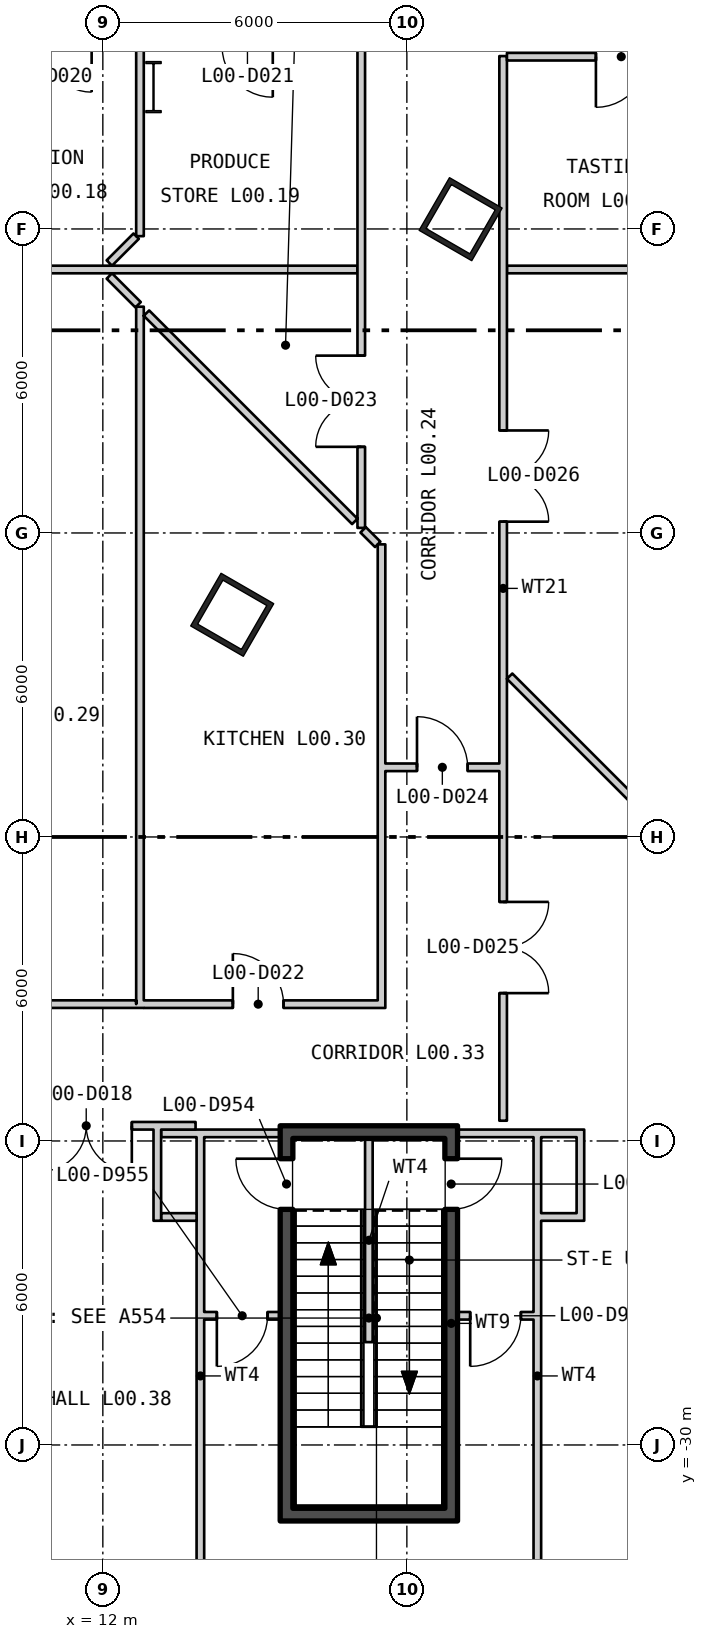
"""IFC4 building model, lengths in metres.
Left out: names, types, materials, properties, quantities, classifications, styles, units other than length and angle.
Written with IfcOpenShell. Run it as: python <this file> out.ifc"""

import sys

from ifc_helpers import new_model, si_unit, direction, frame, frame_2d, origin, origin_2d, place, context, subcontext, project, spatial, rectangle, hollow_rectangle, i_section, extrude, element, fill, save


model = new_model("IFC4")
c1 = context("Model", 3, precision=1e-05, world=origin(), true_north=direction((0.0, 1.0)))
c2 = subcontext(c1, "Body", "Model", "MODEL_VIEW")
j1 = project(units=[si_unit("LENGTHUNIT", "METRE"), si_unit("PLANEANGLEUNIT", "RADIAN")], contexts=[c1])
p1 = place(None, origin())
s1 = spatial("IfcSite", under=j1, at=p1, CompositionType="ELEMENT")
p2 = place(p1, origin())
s2 = spatial("IfcBuilding", under=s1, at=p2, CompositionType="ELEMENT")
p3 = place(p2, origin())
s3 = spatial("IfcBuildingStorey", under=s2, at=p3, CompositionType="ELEMENT", Elevation=0.0)
for number, where, z_axis, x_axis in (
    (1, (14.553, -13.615, 0.0), (0.0, 0.0, 1.0), (0.5, 0.866, 0.0)),
    (2, (19.061, -5.807, 0.0), (0.0, 0.0, 1.0), (0.5, 0.866, 0.0)),
):
    element("IfcColumn", number, at=place(p3, frame(where, z_axis=z_axis, x_axis=x_axis)), inside=s3, PredefinedType="COLUMN", context=c2, shape_type="SweptSolid", body=[
        extrude(hollow_rectangle(XDim=1.2, YDim=1.2, WallThickness=0.1, at=origin_2d()), origin(), (0.0, 0.0, 1.0), 8.4),
    ])
p4 = place(p3, frame((13.0, -3.2, 0.0), z_axis=(0.0, 0.0, 1.0), x_axis=(1.0, 0.0, 0.0)))
e3 = element("IfcColumn", 3, at=p4, inside=s3, PredefinedType="COLUMN", context=c2, shape_type="SweptSolid", body=[
    extrude(i_section(OverallWidth=0.302, OverallDepth=1.008, WebThickness=0.021, FlangeThickness=0.04, at=origin_2d()), origin(), (0.0, 0.0, 1.0), 8.4),
])
p5 = place(p3, frame((15.625, -31.25, 0.0), z_axis=(0.0, 0.0, 1.0), x_axis=(0.0, 1.0, 0.0)))
e4 = element("IfcWall", 4, at=p5, inside=s3, PredefinedType="SHEAR", context=c2, shape_type="SweptSolid", body=[
    extrude(rectangle(XDim=7.3, YDim=0.25, at=frame_2d((3.65, 0.0))), origin(), (0.0, 0.0, 1.0), 8.18),
])
p6 = place(p5, frame((5.9, 0.0, 0.0)))
e5 = element("IfcOpeningElement", 5, at=p6, cuts=e4, PredefinedType="OPENING", context=c2, shape_type="SweptSolid", body=[
    extrude(rectangle(XDim=1.0, YDim=2.1, at=frame_2d((0.5, 1.05))), frame((0.0, 0.135, 0.0), z_axis=(0.0, -1.0, 0.0), x_axis=(1.0, 0.0, 0.0)), (0.0, 0.0, 1.0), 0.27),
])
p7 = place(p3, frame((18.875, -31.25, 0.0), z_axis=(0.0, 0.0, 1.0), x_axis=(0.0, 1.0, 0.0)))
e6 = element("IfcWall", 6, at=p7, inside=s3, PredefinedType="SHEAR", context=c2, shape_type="SweptSolid", body=[
    extrude(rectangle(XDim=7.3, YDim=0.25, at=frame_2d((3.65, 0.0))), origin(), (0.0, 0.0, 1.0), 8.18),
])
p8 = place(p7, frame((5.9, 0.0, 0.0)))
e7 = element("IfcOpeningElement", 7, at=p8, cuts=e6, PredefinedType="OPENING", context=c2, shape_type="SweptSolid", body=[
    extrude(rectangle(XDim=1.0, YDim=2.1, at=frame_2d((0.5, 1.05))), frame((0.0, 0.135, 0.0), z_axis=(0.0, -1.0, 0.0), x_axis=(1.0, 0.0, 0.0)), (0.0, 0.0, 1.0), 0.27),
])
for number, where, z_axis, x_axis in (
    (8, (15.5, -31.375, 0.0), (0.0, 0.0, 1.0), (1.0, 0.0, 0.0)),
    (9, (15.5, -23.825, 0.0), (0.0, 0.0, 1.0), (1.0, 0.0, 0.0)),
):
    element("IfcWall", number, at=place(p3, frame(where, z_axis=z_axis, x_axis=x_axis)), inside=s3, PredefinedType="SHEAR", context=c2, shape_type="SweptSolid", body=[
        extrude(rectangle(XDim=3.5, YDim=0.25, at=frame_2d((1.75, 0.0))), origin(), (0.0, 0.0, 1.0), 8.18),
    ])
p9 = place(p3, frame((17.25, -27.97, 0.0), z_axis=(0.0, 0.0, 1.0), x_axis=(0.0, 1.0, 0.0)))
e10 = element("IfcWall", 10, at=p9, inside=s3, PredefinedType="PARTITIONING", context=c2, shape_type="SweptSolid", body=[
    extrude(rectangle(XDim=4.02, YDim=0.15, at=frame_2d((2.01, 0.0))), origin(), (0.0, 0.0, 1.0), 4.0),
])
p10 = place(p3, frame((20.575, -33.35, 0.0), z_axis=(0.0, 0.0, 1.0), x_axis=(0.0, 1.0, 0.0)))
e11 = element("IfcWall", 11, at=p10, inside=s3, PredefinedType="PARTITIONING", context=c2, shape_type="SweptSolid", body=[
    extrude(rectangle(XDim=9.425, YDim=0.15, at=frame_2d((4.713, 0.0))), origin(), (0.0, 0.0, 1.0), 8.18),
])
p11 = place(p3, frame((19.0, -23.85, 0.0), z_axis=(0.0, 0.0, 1.0), x_axis=(1.0, 0.0, 0.0)))
e12 = element("IfcWall", 12, at=p11, inside=s3, PredefinedType="PARTITIONING", context=c2, shape_type="SweptSolid", body=[
    extrude(rectangle(XDim=2.35, YDim=0.15, at=frame_2d((1.175, 0.0))), origin(), (0.0, 0.0, 1.0), 8.18),
])
p12 = place(p3, frame((19.0, -27.45, 0.0), z_axis=(0.0, 0.0, 1.0), x_axis=(1.0, 0.0, 0.0)))
e13 = element("IfcWall", 13, at=p12, inside=s3, PredefinedType="PARTITIONING", context=c2, shape_type="SweptSolid", body=[
    extrude(rectangle(XDim=1.5, YDim=0.15, at=frame_2d((0.75, 0.0))), origin(), (0.0, 0.0, 1.0), 8.18),
])
p13 = place(p12, frame((0.25, 0.0, 0.0)))
e14 = element("IfcOpeningElement", 14, at=p13, cuts=e13, PredefinedType="OPENING", context=c2, shape_type="SweptSolid", body=[
    extrude(rectangle(XDim=1.0, YDim=2.1, at=frame_2d((0.5, 1.05))), frame((0.0, 0.085, 0.0), z_axis=(0.0, -1.0, 0.0), x_axis=(1.0, 0.0, 0.0)), (0.0, 0.0, 1.0), 0.17),
])
p14 = place(p3, frame((21.425, -25.575, 0.0), z_axis=(0.0, 0.0, 1.0), x_axis=(0.0, 1.0, 0.0)))
e15 = element("IfcWall", 15, at=p14, inside=s3, PredefinedType="PARTITIONING", context=c2, shape_type="SweptSolid", body=[
    extrude(rectangle(XDim=1.8, YDim=0.15, at=frame_2d((0.9, 0.0))), origin(), (0.0, 0.0, 1.0), 8.18),
])
p15 = place(p3, frame((20.65, -25.5, 0.0), z_axis=(0.0, 0.0, 1.0), x_axis=(1.0, 0.0, 0.0)))
e16 = element("IfcWall", 16, at=p15, inside=s3, PredefinedType="PARTITIONING", context=c2, shape_type="SweptSolid", body=[
    extrude(rectangle(XDim=0.7, YDim=0.15, at=frame_2d((0.35, 0.0))), origin(), (0.0, 0.0, 1.0), 8.18),
])
p16 = place(p3, frame((13.925, -33.35, 0.0), z_axis=(0.0, 0.0, 1.0), x_axis=(0.0, 1.0, 0.0)))
e17 = element("IfcWall", 17, at=p16, inside=s3, PredefinedType="PARTITIONING", context=c2, shape_type="SweptSolid", body=[
    extrude(rectangle(XDim=9.425, YDim=0.15, at=frame_2d((4.713, 0.0))), origin(), (0.0, 0.0, 1.0), 8.18),
])
p17 = place(p3, frame((15.5, -23.85, 0.0), z_axis=(0.0, 0.0, 1.0), x_axis=(-1.0, 0.0, 0.0)))
e18 = element("IfcWall", 18, at=p17, inside=s3, PredefinedType="PARTITIONING", context=c2, shape_type="SweptSolid", body=[
    extrude(rectangle(XDim=2.35, YDim=0.15, at=frame_2d((1.175, 0.0))), origin(), (0.0, 0.0, 1.0), 8.18),
])
p18 = place(p3, frame((14.0, -27.45, 0.0), z_axis=(0.0, 0.0, 1.0), x_axis=(1.0, 0.0, 0.0)))
e19 = element("IfcWall", 19, at=p18, inside=s3, PredefinedType="PARTITIONING", context=c2, shape_type="SweptSolid", body=[
    extrude(rectangle(XDim=1.5, YDim=0.15, at=frame_2d((0.75, 0.0))), origin(), (0.0, 0.0, 1.0), 8.18),
])
p19 = place(p18, frame((0.25, 0.0, 0.0)))
e20 = element("IfcOpeningElement", 20, at=p19, cuts=e19, PredefinedType="OPENING", context=c2, shape_type="SweptSolid", body=[
    extrude(rectangle(XDim=1.0, YDim=2.1, at=frame_2d((0.5, 1.05))), frame((0.0, 0.085, 0.0), z_axis=(0.0, -1.0, 0.0), x_axis=(1.0, 0.0, 0.0)), (0.0, 0.0, 1.0), 0.17),
])
p20 = place(p3, frame((13.075, -25.575, 0.0), z_axis=(0.0, 0.0, 1.0), x_axis=(0.0, 1.0, 0.0)))
e21 = element("IfcWall", 21, at=p20, inside=s3, PredefinedType="PARTITIONING", context=c2, shape_type="SweptSolid", body=[
    extrude(rectangle(XDim=1.8, YDim=0.15, at=frame_2d((0.9, 0.0))), origin(), (0.0, 0.0, 1.0), 8.18),
])
p21 = place(p3, frame((13.85, -25.5, 0.0), z_axis=(0.0, 0.0, 1.0), x_axis=(-1.0, 0.0, 0.0)))
e22 = element("IfcWall", 22, at=p21, inside=s3, PredefinedType="PARTITIONING", context=c2, shape_type="SweptSolid", body=[
    extrude(rectangle(XDim=0.7, YDim=0.15, at=frame_2d((0.35, 0.0))), origin(), (0.0, 0.0, 1.0), 8.18),
])
p22 = place(p3, frame((3.37, -21.3, 0.0), z_axis=(0.0, 0.0, 1.0), x_axis=(0.999999994204, 0.000107665805, 0.0)))
e23 = element("IfcWall", 23, at=p22, inside=s3, PredefinedType="PARTITIONING", context=c2, shape_type="SweptSolid", body=[
    extrude(rectangle(XDim=9.288, YDim=0.15, at=frame_2d((4.644, 0.0))), origin(), (0.0, 0.0, 1.0), 8.18),
])
p23 = place(p3, frame((6.442, -23.7, 0.0), z_axis=(0.0, 0.0, 1.0), x_axis=(1.0, 0.0, 0.0)))
e24 = element("IfcWall", 24, at=p23, inside=s3, PredefinedType="PARTITIONING", context=c2, shape_type="SweptSolid", body=[
    extrude(rectangle(XDim=7.388, YDim=0.15, at=frame_2d((3.694, 0.0))), origin(), (0.0, 0.0, 1.0), 8.18),
])
p24 = place(p23, frame((4.33, 0.0, 0.0)))
e25 = element("IfcOpeningElement", 25, at=p24, cuts=e24, PredefinedType="OPENING", context=c2, shape_type="SweptSolid", body=[
    extrude(rectangle(XDim=1.8, YDim=2.1, at=frame_2d((0.9, 1.05))), frame((0.0, 0.085, 0.0), z_axis=(0.0, -1.0, 0.0), x_axis=(1.0, 0.0, 0.0)), (0.0, 0.0, 1.0), 0.17),
])
p25 = place(p3, frame((9.075, -6.8, 0.0), z_axis=(0.0, 0.0, 1.0), x_axis=(1.0, 0.0, 0.0)))
e26 = element("IfcWall", 26, at=p25, inside=s3, PredefinedType="PARTITIONING", context=c2, shape_type="SweptSolid", body=[
    extrude(rectangle(XDim=7.95, YDim=0.15, at=frame_2d((3.975, 0.0))), origin(), (0.0, 0.0, 1.0), 8.18),
])
p26 = place(p3, frame((12.128, -6.928, 0.0), z_axis=(0.0, 0.0, 1.0), x_axis=(0.707106781187, -0.707106781187, 0.0)))
e27 = element("IfcWall", 27, at=p26, inside=s3, PredefinedType="PARTITIONING", context=c2, shape_type="SweptSolid", body=[
    extrude(rectangle(XDim=0.803, YDim=0.15, at=frame_2d((0.402, 0.0))), origin(), (0.0, 0.0, 1.0), 8.18),
])
p27 = place(p3, frame((12.128, -6.672, 0.0), z_axis=(0.0, 0.0, 1.0), x_axis=(0.707106781187, 0.707106781187, 0.0)))
e28 = element("IfcWall", 28, at=p27, inside=s3, PredefinedType="PARTITIONING", context=c2, shape_type="SweptSolid", body=[
    extrude(rectangle(XDim=0.75, YDim=0.15, at=frame_2d((0.375, 0.0))), origin(), (0.0, 0.0, 1.0), 8.18),
])
p28 = place(p3, frame((12.733, -21.374, 0.0), z_axis=(0.0, 0.0, 1.0), x_axis=(0.0, 1.0, 0.0)))
e29 = element("IfcWall", 29, at=p28, inside=s3, PredefinedType="PARTITIONING", context=c2, shape_type="SweptSolid", body=[
    extrude(rectangle(XDim=1.575, YDim=0.15, at=frame_2d((0.787, 0.0))), origin(), (0.0, 0.0, 1.0), 7.49),
])
p29 = place(p3, frame((12.733, -19.799, 0.0), z_axis=(0.0, 0.0, 1.0), x_axis=(0.0, 1.0, 0.0)))
e30 = element("IfcWall", 30, at=p29, inside=s3, PredefinedType="PARTITIONING", context=c2, shape_type="SweptSolid", body=[
    extrude(rectangle(XDim=2.832, YDim=0.15, at=frame_2d((1.416, 0.0))), origin(), (0.0, 0.0, 1.0), 7.58),
])
p30 = place(p3, frame((12.733, -16.967, 0.0), z_axis=(0.0, 0.0, 1.0), x_axis=(0.0, 1.0, 0.0)))
e31 = element("IfcWall", 31, at=p30, inside=s3, PredefinedType="PARTITIONING", context=c2, shape_type="SweptSolid", body=[
    extrude(rectangle(XDim=0.4, YDim=0.15, at=frame_2d((0.2, 0.0))), origin(), (0.0, 0.0, 1.0), 8.18),
])
p31 = place(p3, frame((12.733, -16.567, 0.0), z_axis=(0.0, 0.0, 1.0), x_axis=(0.0, 1.0, 0.0)))
e32 = element("IfcWall", 32, at=p31, inside=s3, PredefinedType="PARTITIONING", context=c2, shape_type="SweptSolid", body=[
    extrude(rectangle(XDim=2.717, YDim=0.15, at=frame_2d((1.359, 0.0))), origin(), (0.0, 0.0, 1.0), 7.58),
])
p32 = place(p3, frame((12.733, -13.85, 0.0), z_axis=(0.0, 0.0, 1.0), x_axis=(0.0, 1.0, 0.0)))
e33 = element("IfcWall", 33, at=p32, inside=s3, PredefinedType="PARTITIONING", context=c2, shape_type="SweptSolid", body=[
    extrude(rectangle(XDim=6.316, YDim=0.15, at=frame_2d((3.158, 0.0))), origin(), (0.0, 0.0, 1.0), 7.49),
])
p33 = place(p3, frame((12.733, -6.142, 0.0), z_axis=(0.0, 0.0, 1.0), x_axis=(0.0, 1.0, 0.0)))
e34 = element("IfcWall", 34, at=p33, inside=s3, PredefinedType="PARTITIONING", context=c2, shape_type="SweptSolid", body=[
    extrude(rectangle(XDim=3.042, YDim=0.15, at=frame_2d((1.521, 0.0))), origin(), (0.0, 0.0, 1.0), 7.49),
])
p34 = place(p3, frame((12.733, -3.1, 0.0), z_axis=(0.0, 0.0, 1.0), x_axis=(0.0, 1.0, 0.0)))
e35 = element("IfcWall", 35, at=p34, inside=s3, PredefinedType="PARTITIONING", context=c2, shape_type="SweptSolid", body=[
    extrude(rectangle(XDim=0.625, YDim=0.15, at=frame_2d((0.312, 0.0))), origin(), (0.0, 0.0, 1.0), 7.58),
])
p35 = place(p3, frame((12.808, -21.3, 0.0), z_axis=(0.0, 0.0, 1.0), x_axis=(1.0, 0.0, 0.0)))
e36 = element("IfcWall", 36, at=p35, inside=s3, PredefinedType="PARTITIONING", context=c2, shape_type="SweptSolid", body=[
    extrude(rectangle(XDim=4.617, YDim=0.15, at=frame_2d((2.308, 0.0))), origin(), (0.0, 0.0, 1.0), 8.18),
])
p36 = place(p35, frame((1.758, 0.0, 0.0)))
e37 = element("IfcOpeningElement", 37, at=p36, cuts=e36, PredefinedType="OPENING", context=c2, shape_type="SweptSolid", body=[
    extrude(rectangle(XDim=1.0, YDim=2.1, at=frame_2d((0.5, 1.05))), frame((0.0, 0.085, 0.0), z_axis=(0.0, -1.0, 0.0), x_axis=(1.0, 0.0, 0.0)), (0.0, 0.0, 1.0), 0.17),
])
p37 = place(p3, frame((12.861, -7.661, 0.0), z_axis=(0.0, 0.0, 1.0), x_axis=(0.707106781187, -0.707106781187, 0.0)))
e38 = element("IfcWall", 38, at=p37, inside=s3, PredefinedType="PARTITIONING", context=c2, shape_type="SweptSolid", body=[
    extrude(rectangle(XDim=5.814, YDim=0.15, at=frame_2d((2.907, 0.0))), origin(), (0.0, 0.0, 1.0), 8.18),
])
p38 = place(p3, frame((17.1, -11.9, 0.0), z_axis=(0.0, 0.0, 1.0), x_axis=(0.0, 1.0, 0.0)))
e39 = element("IfcWall", 39, at=p38, inside=s3, PredefinedType="PARTITIONING", context=c2, shape_type="SweptSolid", body=[
    extrude(rectangle(XDim=9.575, YDim=0.15, at=frame_2d((4.787, 0.0))), origin(), (0.0, 0.0, 1.0), 8.18),
])
p39 = place(p38, frame((1.6, 0.0, 0.0)))
e40 = element("IfcOpeningElement", 40, at=p39, cuts=e39, PredefinedType="OPENING", context=c2, shape_type="SweptSolid", body=[
    extrude(rectangle(XDim=1.8, YDim=2.1, at=frame_2d((0.9, 1.05))), frame((0.0, 0.085, 0.0), z_axis=(0.0, -1.0, 0.0), x_axis=(1.0, 0.0, 0.0)), (0.0, 0.0, 1.0), 0.17),
])
p40 = place(p3, frame((17.137, -11.938, 0.0), z_axis=(0.0, 0.0, 1.0), x_axis=(0.708335460904, -0.705875962776, 0.0)))
e41 = element("IfcWall", 41, at=p40, inside=s3, PredefinedType="PARTITIONING", context=c2, shape_type="SweptSolid", body=[
    extrude(rectangle(XDim=0.407, YDim=0.15, at=frame_2d((0.203, 0.0))), origin(), (0.0, 0.0, 1.0), 8.18),
])
p41 = place(p3, frame((17.5, -21.375, 0.0), z_axis=(0.0, 0.0, 1.0), x_axis=(0.0, 1.0, 0.0)))
e42 = element("IfcWall", 42, at=p41, inside=s3, PredefinedType="PARTITIONING", context=c2, shape_type="SweptSolid", body=[
    extrude(rectangle(XDim=9.15, YDim=0.15, at=frame_2d((4.575, 0.0))), origin(), (0.0, 0.0, 1.0), 8.18),
])
p42 = place(p3, frame((17.575, -16.625, 0.0), z_axis=(0.0, 0.0, 1.0), x_axis=(1.0, 0.0, 0.0)))
e43 = element("IfcWall", 43, at=p42, inside=s3, PredefinedType="PARTITIONING", context=c2, shape_type="SweptSolid", body=[
    extrude(rectangle(XDim=2.25, YDim=0.15, at=frame_2d((1.125, 0.0))), origin(), (0.0, 0.0, 1.0), 8.18),
])
p43 = place(p42, frame((0.625, 0.0, 0.0)))
e44 = element("IfcOpeningElement", 44, at=p43, cuts=e43, PredefinedType="OPENING", context=c2, shape_type="SweptSolid", body=[
    extrude(rectangle(XDim=1.0, YDim=2.1, at=frame_2d((0.5, 1.05))), frame((0.0, 0.085, 0.0), z_axis=(0.0, -1.0, 0.0), x_axis=(1.0, 0.0, 0.0)), (0.0, 0.0, 1.0), 0.17),
])
p44 = place(p3, frame((19.9, -23.6, 0.0), z_axis=(0.0, 0.0, 1.0), x_axis=(0.0, 1.0, 0.0)))
e45 = element("IfcWall", 45, at=p44, inside=s3, PredefinedType="PARTITIONING", context=c2, shape_type="SweptSolid", body=[
    extrude(rectangle(XDim=21.012, YDim=0.15, at=frame_2d((10.506, 0.0))), origin(), (0.0, 0.0, 1.0), 8.18),
])
p45 = place(p44, frame((2.518, 0.0, 0.0)))
e46 = element("IfcOpeningElement", 46, at=p45, cuts=e45, PredefinedType="OPENING", context=c2, shape_type="SweptSolid", body=[
    extrude(rectangle(XDim=1.8, YDim=2.1, at=frame_2d((0.9, 1.05))), frame((0.0, 0.085, 0.0), z_axis=(0.0, -1.0, 0.0), x_axis=(1.0, 0.0, 0.0)), (0.0, 0.0, 1.0), 0.17),
])
p46 = place(p44, frame((11.823, 0.0, 0.0)))
e47 = element("IfcOpeningElement", 47, at=p46, cuts=e45, PredefinedType="OPENING", context=c2, shape_type="SweptSolid", body=[
    extrude(rectangle(XDim=1.8, YDim=2.1, at=frame_2d((0.9, 1.05))), frame((0.0, 0.085, 0.0), z_axis=(0.0, -1.0, 0.0), x_axis=(1.0, 0.0, 0.0)), (0.0, 0.0, 1.0), 0.17),
])
p47 = place(p3, frame((19.975, -6.8, 0.0), z_axis=(0.0, 0.0, 1.0), x_axis=(1.0, 0.0, 0.0)))
e48 = element("IfcWall", 48, at=p47, inside=s3, PredefinedType="PARTITIONING", context=c2, shape_type="SweptSolid", body=[
    extrude(rectangle(XDim=6.775, YDim=0.15, at=frame_2d((3.388, 0.0))), origin(), (0.0, 0.0, 1.0), 7.39),
])
p48 = place(p3, frame((19.975, -2.6, 0.0), z_axis=(0.0, 0.0, 1.0), x_axis=(1.0, 0.0, 0.0)))
e49 = element("IfcWall", 49, at=p48, inside=s3, PredefinedType="PARTITIONING", context=c2, shape_type="SweptSolid", body=[
    extrude(rectangle(XDim=5.713, YDim=0.15, at=frame_2d((2.857, 0.0))), origin(), (0.0, 0.0, 1.0), 8.18),
])
p49 = place(p48, frame((1.756, 0.0, 0.0)))
e50 = element("IfcOpeningElement", 50, at=p49, cuts=e49, PredefinedType="OPENING", context=c2, shape_type="SweptSolid", body=[
    extrude(rectangle(XDim=1.0, YDim=2.1, at=frame_2d((0.5, 1.05))), frame((0.0, 0.085, 0.0), z_axis=(0.0, -1.0, 0.0), x_axis=(1.0, 0.0, 0.0)), (0.0, 0.0, 1.0), 0.17),
])
p50 = place(p3, frame((20.028, -14.827, 0.0), z_axis=(0.0, 0.0, 1.0), x_axis=(0.707106781187, -0.707106781187, 0.0)))
e51 = element("IfcWall", 51, at=p50, inside=s3, PredefinedType="PARTITIONING", context=c2, shape_type="SweptSolid", body=[
    extrude(rectangle(XDim=7.068, YDim=0.15, at=frame_2d((3.534, 0.0))), origin(), (0.0, 0.0, 1.0), 8.18),
])
p51 = place(p8, origin())
e52 = element("IfcDoor", 52, at=p51, inside=s3, OperationType="SINGLE_SWING_RIGHT", PredefinedType="DOOR", context=c2, shape_type="SweptSolid", body=[
    extrude(rectangle(XDim=1.0, YDim=2.1, at=frame_2d((0.5, 1.05))), frame((0.0, 0.025, 0.0), z_axis=(0.0, -1.0, 0.0), x_axis=(1.0, 0.0, 0.0)), (0.0, 0.0, 1.0), 0.05),
])
fill(e7, e52)
p52 = place(p13, origin())
e53 = element("IfcDoor", 53, at=p52, inside=s3, OperationType="SINGLE_SWING_LEFT", PredefinedType="DOOR", context=c2, shape_type="SweptSolid", body=[
    extrude(rectangle(XDim=1.0, YDim=2.1, at=frame_2d((0.5, 1.05))), frame((0.0, 0.025, 0.0), z_axis=(0.0, -1.0, 0.0), x_axis=(1.0, 0.0, 0.0)), (0.0, 0.0, 1.0), 0.05),
])
fill(e14, e53)
p53 = place(p6, origin())
e54 = element("IfcDoor", 54, at=p53, inside=s3, OperationType="SINGLE_SWING_LEFT", PredefinedType="DOOR", context=c2, shape_type="SweptSolid", body=[
    extrude(rectangle(XDim=1.0, YDim=2.1, at=frame_2d((0.5, 1.05))), frame((0.0, 0.025, 0.0), z_axis=(0.0, -1.0, 0.0), x_axis=(1.0, 0.0, 0.0)), (0.0, 0.0, 1.0), 0.05),
])
fill(e5, e54)
p54 = place(p19, origin())
e55 = element("IfcDoor", 55, at=p54, inside=s3, OperationType="SINGLE_SWING_LEFT", PredefinedType="DOOR", context=c2, shape_type="SweptSolid", body=[
    extrude(rectangle(XDim=1.0, YDim=2.1, at=frame_2d((0.5, 1.05))), frame((0.0, 0.025, 0.0), z_axis=(0.0, -1.0, 0.0), x_axis=(1.0, 0.0, 0.0)), (0.0, 0.0, 1.0), 0.05),
])
fill(e20, e55)
p55 = place(p24, origin())
e56 = element("IfcDoor", 56, at=p55, inside=s3, OperationType="DOUBLE_DOOR_SINGLE_SWING", PredefinedType="DOOR", context=c2, shape_type="SweptSolid", body=[
    extrude(rectangle(XDim=1.8, YDim=2.1, at=frame_2d((0.9, 1.05))), frame((0.0, 0.025, 0.0), z_axis=(0.0, -1.0, 0.0), x_axis=(1.0, 0.0, 0.0)), (0.0, 0.0, 1.0), 0.05),
])
fill(e25, e56)
p56 = place(p36, origin())
e57 = element("IfcDoor", 57, at=p56, inside=s3, OperationType="SINGLE_SWING_RIGHT", PredefinedType="DOOR", context=c2, shape_type="SweptSolid", body=[
    extrude(rectangle(XDim=1.0, YDim=2.1, at=frame_2d((0.5, 1.05))), frame((0.0, 0.025, 0.0), z_axis=(0.0, -1.0, 0.0), x_axis=(1.0, 0.0, 0.0)), (0.0, 0.0, 1.0), 0.05),
])
fill(e37, e57)
p57 = place(p39, origin())
e58 = element("IfcDoor", 58, at=p57, inside=s3, OperationType="DOUBLE_DOOR_SINGLE_SWING", PredefinedType="DOOR", context=c2, shape_type="SweptSolid", body=[
    extrude(rectangle(XDim=1.8, YDim=2.1, at=frame_2d((0.9, 1.05))), frame((0.0, 0.025, 0.0), z_axis=(0.0, -1.0, 0.0), x_axis=(1.0, 0.0, 0.0)), (0.0, 0.0, 1.0), 0.05),
])
fill(e40, e58)
p58 = place(p43, origin())
e59 = element("IfcDoor", 59, at=p58, inside=s3, OperationType="SINGLE_SWING_RIGHT", PredefinedType="DOOR", context=c2, shape_type="SweptSolid", body=[
    extrude(rectangle(XDim=1.0, YDim=2.1, at=frame_2d((0.5, 1.05))), frame((0.0, 0.025, 0.0), z_axis=(0.0, -1.0, 0.0), x_axis=(1.0, 0.0, 0.0)), (0.0, 0.0, 1.0), 0.05),
])
fill(e44, e59)
p59 = place(p45, origin())
e60 = element("IfcDoor", 60, at=p59, inside=s3, OperationType="DOUBLE_DOOR_SINGLE_SWING", PredefinedType="DOOR", context=c2, shape_type="SweptSolid", body=[
    extrude(rectangle(XDim=1.8, YDim=2.1, at=frame_2d((0.9, 1.05))), frame((0.0, 0.025, 0.0), z_axis=(0.0, -1.0, 0.0), x_axis=(1.0, 0.0, 0.0)), (0.0, 0.0, 1.0), 0.05),
])
fill(e46, e60)
p60 = place(p46, origin())
e61 = element("IfcDoor", 61, at=p60, inside=s3, OperationType="DOUBLE_DOOR_SINGLE_SWING", PredefinedType="DOOR", context=c2, shape_type="SweptSolid", body=[
    extrude(rectangle(XDim=1.8, YDim=2.1, at=frame_2d((0.9, 1.05))), frame((0.0, 0.025, 0.0), z_axis=(0.0, -1.0, 0.0), x_axis=(1.0, 0.0, 0.0)), (0.0, 0.0, 1.0), 0.05),
])
fill(e47, e61)
p61 = place(p49, origin())
e62 = element("IfcDoor", 62, at=p61, inside=s3, OperationType="SINGLE_SWING_LEFT", PredefinedType="DOOR", context=c2, shape_type="SweptSolid", body=[
    extrude(rectangle(XDim=1.0, YDim=2.1, at=frame_2d((0.5, 1.05))), frame((0.0, 0.025, 0.0), z_axis=(0.0, -1.0, 0.0), x_axis=(1.0, 0.0, 0.0)), (0.0, 0.0, 1.0), 0.05),
])
fill(e50, e62)
save(model, sys.argv[1])
